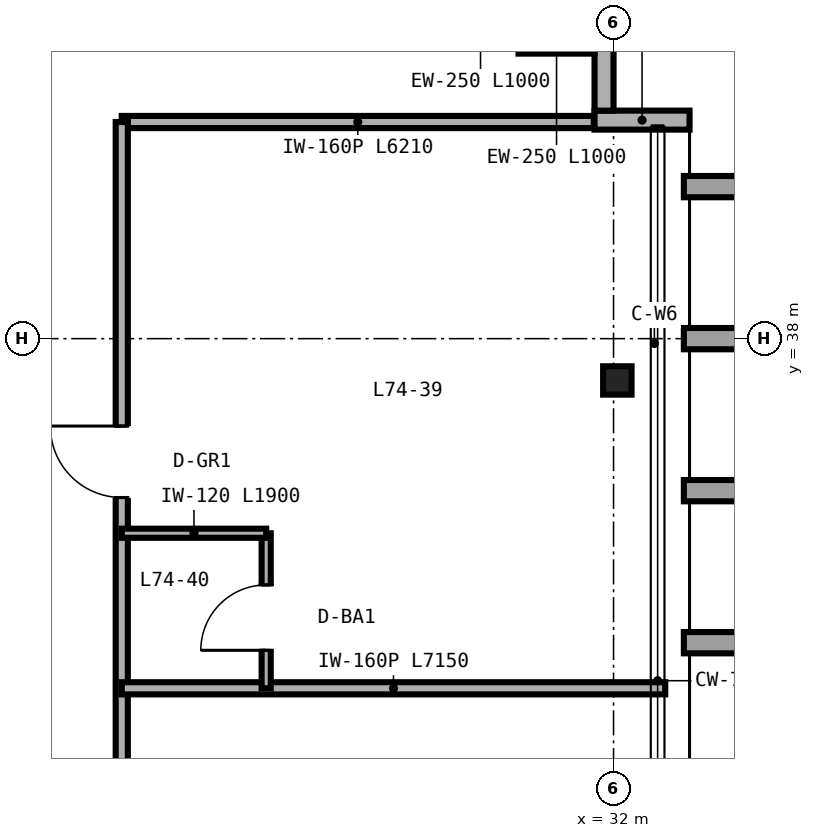
"""IFC4 building model, lengths in metres.
Left out: names, types, materials, properties, quantities, classifications, styles, units other than length and angle.
Written with IfcOpenShell. Run it as: python <this file> out.ifc"""

import sys

from ifc_helpers import new_model, si_unit, direction, frame, frame_2d, origin, origin_2d, place, context, subcontext, project, spatial, rectangle, i_section, extrude, source, transform, mapped, element, fill, save


model = new_model("IFC4")
c1 = context("Model", 3, precision=1e-05, world=origin(), true_north=direction((0.0, 1.0)))
c2 = subcontext(c1, "Body", "Model", "MODEL_VIEW")
j1 = project(units=[si_unit("LENGTHUNIT", "METRE"), si_unit("PLANEANGLEUNIT", "RADIAN")], contexts=[c1])
p1 = place(None, origin())
s1 = spatial("IfcSite", under=j1, at=p1, CompositionType="ELEMENT")
p2 = place(p1, origin())
s2 = spatial("IfcBuilding", under=s1, at=p2, CompositionType="ELEMENT")
p3 = place(p2, frame((0.0, 0.0, 290.4)))
s3 = spatial("IfcBuildingStorey", under=s2, at=p3, CompositionType="ELEMENT", Elevation=290.4)
m1 = source(origin(), c2, "Body", "SweptSolid", [
    extrude(i_section(OverallWidth=0.374, OverallDepth=0.373, WebThickness=0.016, FlangeThickness=0.026, FilletRadius=0.025, at=origin_2d()), origin(), (0.0, 0.0, 1.0), 3.38),
])
p4 = place(p3, frame((32.05, 37.45, 0.0), z_axis=(0.0, 0.0, 1.0), x_axis=(1.0, 0.0, 0.0)))
e1 = element("IfcColumn", 1, at=p4, inside=s3, PredefinedType="COLUMN", context=c2, shape_type="MappedRepresentation", body=[
    mapped(m1, transform((0.0, 0.0, 0.0), scale=1.0)),
])
p5 = place(p3, frame((33.0, 40.875, 0.0), z_axis=(0.0, 0.0, 1.0), x_axis=(-1.0, 0.0, 0.0)))
e2 = element("IfcWall", 2, at=p5, inside=s3, PredefinedType="SOLIDWALL", context=c2, shape_type="SweptSolid", body=[
    extrude(rectangle(XDim=1.25, YDim=0.25, at=frame_2d((0.625, 0.0))), origin(), (0.0, 0.0, 1.0), 3.38),
])
for number, where, z_axis, x_axis in (
    (3, (31.875, 41.0, 0.0), (0.0, 0.0, 1.0), (0.0, 1.0, 0.0)),
    (4, (31.75, 41.875, 0.0), (0.0, 0.0, 1.0), (-1.0, 0.0, 0.0)),
):
    element("IfcWall", number, at=place(p3, frame(where, z_axis=z_axis, x_axis=x_axis)), inside=s3, PredefinedType="SOLIDWALL", context=c2, shape_type="SweptSolid", body=[
        extrude(rectangle(XDim=1.0, YDim=0.25, at=frame_2d((0.5, 0.0))), origin(), (0.0, 0.0, 1.0), 3.38),
    ])
p6 = place(p3, frame((25.53, 40.85, 0.0), z_axis=(0.0, 0.0, 1.0), x_axis=(1.0, 0.0, 0.0)))
e5 = element("IfcWall", 5, at=p6, inside=s3, PredefinedType="PARTITIONING", context=c2, shape_type="SweptSolid", body=[
    extrude(rectangle(XDim=6.21, YDim=0.16, at=frame_2d((3.105, 0.0))), origin(), (0.0, 0.0, 1.0), 3.38),
])
p7 = place(p3, frame((25.53, 11.15, 0.0), z_axis=(0.0, 0.0, 1.0), x_axis=(0.0, 1.0, 0.0)))
e6 = element("IfcWall", 6, at=p7, inside=s3, PredefinedType="PARTITIONING", context=c2, shape_type="SweptSolid", body=[
    extrude(rectangle(XDim=29.7, YDim=0.16, at=frame_2d((14.85, 0.0))), origin(), (0.0, 0.0, 1.0), 2.524),
])
p8 = place(p7, frame((2.51, 0.0, 0.0)))
e7 = element("IfcOpeningElement", 7, at=p8, cuts=e6, PredefinedType="OPENING", context=c2, shape_type="SweptSolid", body=[
    extrude(rectangle(XDim=0.94, YDim=2.15, at=frame_2d((0.47, 1.075))), frame((0.0, 0.09, 0.0), z_axis=(0.0, -1.0, 0.0), x_axis=(1.0, 0.0, 0.0)), (0.0, 0.0, 1.0), 0.18),
])
p9 = place(p7, frame((9.96, 0.0, 0.0)))
e8 = element("IfcOpeningElement", 8, at=p9, cuts=e6, PredefinedType="OPENING", context=c2, shape_type="SweptSolid", body=[
    extrude(rectangle(XDim=0.94, YDim=2.15, at=frame_2d((0.47, 1.075))), frame((0.0, 0.09, 0.0), z_axis=(0.0, -1.0, 0.0), x_axis=(1.0, 0.0, 0.0)), (0.0, 0.0, 1.0), 0.18),
])
p10 = place(p7, frame((17.36, 0.0, 0.0)))
e9 = element("IfcOpeningElement", 9, at=p10, cuts=e6, PredefinedType="OPENING", context=c2, shape_type="SweptSolid", body=[
    extrude(rectangle(XDim=0.94, YDim=2.15, at=frame_2d((0.47, 1.075))), frame((0.0, 0.09, 0.0), z_axis=(0.0, -1.0, 0.0), x_axis=(1.0, 0.0, 0.0)), (0.0, 0.0, 1.0), 0.18),
])
p11 = place(p7, frame((24.76, 0.0, 0.0)))
e10 = element("IfcOpeningElement", 10, at=p11, cuts=e6, PredefinedType="OPENING", context=c2, shape_type="SweptSolid", body=[
    extrude(rectangle(XDim=0.94, YDim=2.15, at=frame_2d((0.47, 1.075))), frame((0.0, 0.09, 0.0), z_axis=(0.0, -1.0, 0.0), x_axis=(1.0, 0.0, 0.0)), (0.0, 0.0, 1.0), 0.18),
])
p12 = place(p3, frame((25.53, 33.4, 0.0), z_axis=(0.0, 0.0, 1.0), x_axis=(1.0, 0.0, 0.0)))
e11 = element("IfcWall", 11, at=p12, inside=s3, PredefinedType="PARTITIONING", context=c2, shape_type="SweptSolid", body=[
    extrude(rectangle(XDim=7.15, YDim=0.16, at=frame_2d((3.575, 0.0))), origin(), (0.0, 0.0, 1.0), 2.763),
])
p13 = place(p3, frame((27.43, 33.4, 0.0), z_axis=(0.0, 0.0, 1.0), x_axis=(0.0, 1.0, 0.0)))
e12 = element("IfcWall", 12, at=p13, inside=s3, PredefinedType="PARTITIONING", context=c2, shape_type="SweptSolid", body=[
    extrude(rectangle(XDim=2.04, YDim=0.12, at=frame_2d((1.02, 0.0))), origin(), (0.0, 0.0, 1.0), 3.38),
])
p14 = place(p13, frame((0.5, 0.0, 0.0)))
e13 = element("IfcOpeningElement", 13, at=p14, cuts=e12, PredefinedType="OPENING", context=c2, shape_type="SweptSolid", body=[
    extrude(rectangle(XDim=0.86, YDim=2.1, at=frame_2d((0.43, 1.05))), frame((0.0, 0.07, 0.0), z_axis=(0.0, -1.0, 0.0), x_axis=(1.0, 0.0, 0.0)), (0.0, 0.0, 1.0), 0.14),
])
p15 = place(p3, frame((25.53, 35.44, 0.0), z_axis=(0.0, 0.0, 1.0), x_axis=(1.0, 0.0, 0.0)))
e14 = element("IfcWall", 14, at=p15, inside=s3, PredefinedType="PARTITIONING", context=c2, shape_type="SweptSolid", body=[
    extrude(rectangle(XDim=1.9, YDim=0.12, at=frame_2d((0.95, 0.0))), origin(), (0.0, 0.0, 1.0), 3.38),
])
m2 = source(origin(), c2, "Body", "SweptSolid", [
    extrude(rectangle(XDim=0.86, YDim=2.1, at=frame_2d((0.43, 1.05))), frame((0.0, 0.025, 0.0), z_axis=(0.0, -1.0, 0.0), x_axis=(1.0, 0.0, 0.0)), (0.0, 0.0, 1.0), 0.05),
])
p16 = place(p14, origin())
e15 = element("IfcDoor", 15, at=p16, inside=s3, OperationType="SINGLE_SWING_LEFT", PredefinedType="DOOR", context=c2, shape_type="MappedRepresentation", body=[
    mapped(m2, transform((0.0, 0.0, 0.0), scale=1.0)),
])
fill(e13, e15)
m3 = source(origin(), c2, "Body", "SweptSolid", [
    extrude(rectangle(XDim=0.94, YDim=2.15, at=frame_2d((0.47, 1.075))), frame((0.0, 0.025, 0.0), z_axis=(0.0, -1.0, 0.0), x_axis=(1.0, 0.0, 0.0)), (0.0, 0.0, 1.0), 0.05),
])
p17 = place(p11, origin())
e16 = element("IfcDoor", 16, at=p17, inside=s3, OperationType="SINGLE_SWING_RIGHT", PredefinedType="DOOR", context=c2, shape_type="MappedRepresentation", body=[
    mapped(m3, transform((0.0, 0.0, 0.0), scale=1.0)),
])
fill(e10, e16)
save(model, sys.argv[1])
